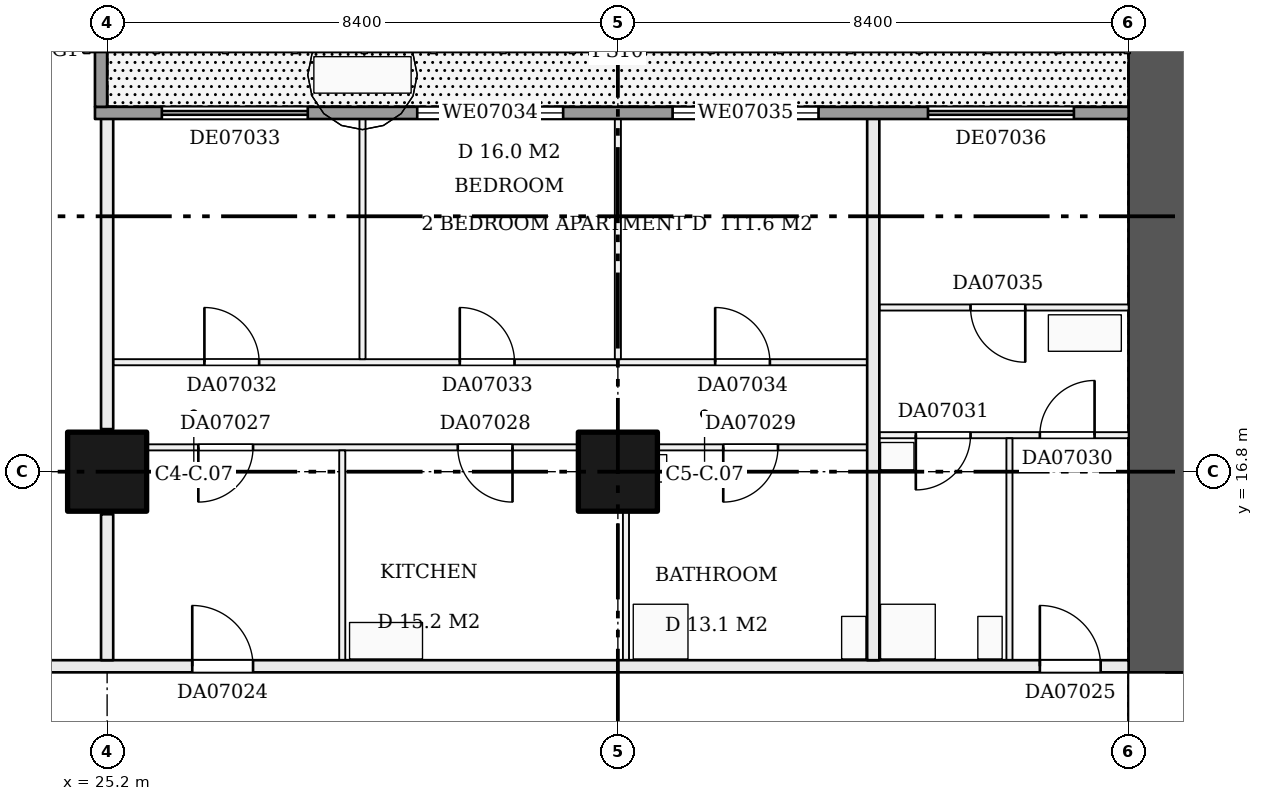
"""IFC4 building model, lengths in metres.
Left out: names, types, materials, properties, quantities, classifications, styles, units other than length and angle.
Written with IfcOpenShell. Run it as: python <this file> out.ifc"""

import sys

from ifc_helpers import new_model, si_unit, direction, frame, frame_2d, origin, origin_2d, place, context, subcontext, project, spatial, rectangle, extrude, element, fill, save


model = new_model("IFC4")
c1 = context("Model", 3, precision=1e-05, world=origin(), true_north=direction((0.0, 1.0)))
c2 = subcontext(c1, "Body", "Model", "MODEL_VIEW")
j1 = project(units=[si_unit("LENGTHUNIT", "METRE"), si_unit("PLANEANGLEUNIT", "RADIAN")], contexts=[c1])
p1 = place(None, origin())
s1 = spatial("IfcSite", under=j1, at=p1, CompositionType="ELEMENT")
p2 = place(p1, origin())
s2 = spatial("IfcBuilding", under=s1, at=p2, CompositionType="ELEMENT")
p3 = place(p2, frame((0.0, 0.0, 35.7)))
s3 = spatial("IfcBuildingStorey", under=s2, at=p3, CompositionType="ELEMENT", Elevation=35.7)
for number, where, z_axis, x_axis in (
    (1, (25.2, 16.8, 0.0), (0.0, 0.0, 1.0), (1.0, 0.0, 0.0)),
    (2, (33.6, 16.8, 0.0), (0.0, 0.0, 1.0), (1.0, 0.0, 0.0)),
):
    element("IfcColumn", number, at=place(p3, frame(where, z_axis=z_axis, x_axis=x_axis)), inside=s3, PredefinedType="COLUMN", context=c2, shape_type="SweptSolid", body=[
        extrude(rectangle(XDim=1.3, YDim=1.3, at=origin_2d()), origin(), (0.0, 0.0, 1.0), 3.22),
    ])
p4 = place(p3, frame((42.6, 9.6, 0.0), z_axis=(0.0, 0.0, 1.0), x_axis=(0.0, 1.0, 0.0)))
e3 = element("IfcWall", 3, at=p4, inside=s3, PredefinedType="SHEAR", context=c2, shape_type="SweptSolid", body=[
    extrude(rectangle(XDim=14.4, YDim=1.2, at=frame_2d((7.2, 0.0))), origin(), (0.0, 0.0, 1.0), 3.22),
])
p5 = place(p4, frame((2.1, 0.0, 0.0)))
e4 = element("IfcOpeningElement", 4, at=p5, cuts=e3, PredefinedType="OPENING", context=c2, shape_type="SweptSolid", body=[
    extrude(rectangle(XDim=1.8, YDim=2.1, at=frame_2d((0.9, 1.05))), frame((0.0, 0.61, 0.0), z_axis=(0.0, -1.0, 0.0), x_axis=(1.0, 0.0, 0.0)), (0.0, 0.0, 1.0), 1.22),
])
p6 = place(p3, frame((16.9, 13.6, 0.0), z_axis=(0.0, 0.0, 1.0), x_axis=(1.0, 0.0, 0.0)))
e5 = element("IfcWall", 5, at=p6, inside=s3, PredefinedType="PARTITIONING", context=c2, shape_type="SweptSolid", body=[
    extrude(rectangle(XDim=25.1, YDim=0.2, at=frame_2d((12.55, 0.0))), origin(), (0.0, 0.0, 1.0), 3.22),
])
p7 = place(p6, frame((9.7, 0.0, 0.0)))
e6 = element("IfcOpeningElement", 6, at=p7, cuts=e5, PredefinedType="OPENING", context=c2, shape_type="SweptSolid", body=[
    extrude(rectangle(XDim=1.0, YDim=2.1, at=frame_2d((0.5, 1.05))), frame((0.0, 0.11, 0.0), z_axis=(0.0, -1.0, 0.0), x_axis=(1.0, 0.0, 0.0)), (0.0, 0.0, 1.0), 0.22),
])
p8 = place(p6, frame((23.64, 0.0, 0.0)))
e7 = element("IfcOpeningElement", 7, at=p8, cuts=e5, PredefinedType="OPENING", context=c2, shape_type="SweptSolid", body=[
    extrude(rectangle(XDim=1.0, YDim=2.1, at=frame_2d((0.5, 1.05))), frame((0.0, 0.11, 0.0), z_axis=(0.0, -1.0, 0.0), x_axis=(1.0, 0.0, 0.0)), (0.0, 0.0, 1.0), 0.22),
])
p9 = place(p6, frame((3.6, 0.0, 0.0)))
e8 = element("IfcOpeningElement", 8, at=p9, cuts=e5, PredefinedType="OPENING", context=c2, shape_type="SweptSolid", body=[
    extrude(rectangle(XDim=1.0, YDim=2.1, at=frame_2d((0.5, 1.05))), frame((0.0, 0.11, 0.0), z_axis=(0.0, -1.0, 0.0), x_axis=(1.0, 0.0, 0.0)), (0.0, 0.0, 1.0), 0.22),
])
p10 = place(p3, frame((25.3, 17.2, 0.0), z_axis=(0.0, 0.0, 1.0), x_axis=(1.0, 0.0, 0.0)))
e9 = element("IfcWall", 9, at=p10, inside=s3, PredefinedType="PARTITIONING", context=c2, shape_type="SweptSolid", body=[
    extrude(rectangle(XDim=12.4, YDim=0.1, at=frame_2d((6.2, 0.0))), origin(), (0.0, 0.0, 1.0), 3.22),
])
p11 = place(p10, frame((1.4, 0.0, 0.0)))
e10 = element("IfcOpeningElement", 10, at=p11, cuts=e9, PredefinedType="OPENING", context=c2, shape_type="SweptSolid", body=[
    extrude(rectangle(XDim=0.9, YDim=2.1, at=frame_2d((0.45, 1.05))), frame((0.0, 0.06, 0.0), z_axis=(0.0, -1.0, 0.0), x_axis=(1.0, 0.0, 0.0)), (0.0, 0.0, 1.0), 0.12),
])
p12 = place(p10, frame((5.667, 0.0, 0.0)))
e11 = element("IfcOpeningElement", 11, at=p12, cuts=e9, PredefinedType="OPENING", context=c2, shape_type="SweptSolid", body=[
    extrude(rectangle(XDim=0.9, YDim=2.1, at=frame_2d((0.45, 1.05))), frame((0.0, 0.06, 0.0), z_axis=(0.0, -1.0, 0.0), x_axis=(1.0, 0.0, 0.0)), (0.0, 0.0, 1.0), 0.12),
])
p13 = place(p10, frame((10.033, 0.0, 0.0)))
e12 = element("IfcOpeningElement", 12, at=p13, cuts=e9, PredefinedType="OPENING", context=c2, shape_type="SweptSolid", body=[
    extrude(rectangle(XDim=0.9, YDim=2.1, at=frame_2d((0.45, 1.05))), frame((0.0, 0.06, 0.0), z_axis=(0.0, -1.0, 0.0), x_axis=(1.0, 0.0, 0.0)), (0.0, 0.0, 1.0), 0.12),
])
p14 = place(p3, frame((37.9, 17.4, 0.0), z_axis=(0.0, 0.0, 1.0), x_axis=(1.0, 0.0, 0.0)))
e13 = element("IfcWall", 13, at=p14, inside=s3, PredefinedType="PARTITIONING", context=c2, shape_type="SweptSolid", body=[
    extrude(rectangle(XDim=4.1, YDim=0.1, at=frame_2d((2.05, 0.0))), origin(), (0.0, 0.0, 1.0), 3.22),
])
p15 = place(p14, frame((2.64, 0.0, 0.0)))
e14 = element("IfcOpeningElement", 14, at=p15, cuts=e13, PredefinedType="OPENING", context=c2, shape_type="SweptSolid", body=[
    extrude(rectangle(XDim=0.9, YDim=2.1, at=frame_2d((0.45, 1.05))), frame((0.0, 0.06, 0.0), z_axis=(0.0, -1.0, 0.0), x_axis=(1.0, 0.0, 0.0)), (0.0, 0.0, 1.0), 0.12),
])
p16 = place(p14, frame((0.6, 0.0, 0.0)))
e15 = element("IfcOpeningElement", 15, at=p16, cuts=e13, PredefinedType="OPENING", context=c2, shape_type="SweptSolid", body=[
    extrude(rectangle(XDim=0.9, YDim=2.1, at=frame_2d((0.45, 1.05))), frame((0.0, 0.06, 0.0), z_axis=(0.0, -1.0, 0.0), x_axis=(1.0, 0.0, 0.0)), (0.0, 0.0, 1.0), 0.12),
])
p17 = place(p3, frame((25.3, 18.6, 0.0), z_axis=(0.0, 0.0, 1.0), x_axis=(1.0, 0.0, 0.0)))
e16 = element("IfcWall", 16, at=p17, inside=s3, PredefinedType="PARTITIONING", context=c2, shape_type="SweptSolid", body=[
    extrude(rectangle(XDim=12.4, YDim=0.1, at=frame_2d((6.2, 0.0))), origin(), (0.0, 0.0, 1.0), 3.22),
])
p18 = place(p17, frame((1.5, 0.0, 0.0)))
e17 = element("IfcOpeningElement", 17, at=p18, cuts=e16, PredefinedType="OPENING", context=c2, shape_type="SweptSolid", body=[
    extrude(rectangle(XDim=0.9, YDim=2.1, at=frame_2d((0.45, 1.05))), frame((0.0, 0.06, 0.0), z_axis=(0.0, -1.0, 0.0), x_axis=(1.0, 0.0, 0.0)), (0.0, 0.0, 1.0), 0.12),
])
p19 = place(p17, frame((5.7, 0.0, 0.0)))
e18 = element("IfcOpeningElement", 18, at=p19, cuts=e16, PredefinedType="OPENING", context=c2, shape_type="SweptSolid", body=[
    extrude(rectangle(XDim=0.9, YDim=2.1, at=frame_2d((0.45, 1.05))), frame((0.0, 0.06, 0.0), z_axis=(0.0, -1.0, 0.0), x_axis=(1.0, 0.0, 0.0)), (0.0, 0.0, 1.0), 0.12),
])
p20 = place(p17, frame((9.9, 0.0, 0.0)))
e19 = element("IfcOpeningElement", 19, at=p20, cuts=e16, PredefinedType="OPENING", context=c2, shape_type="SweptSolid", body=[
    extrude(rectangle(XDim=0.9, YDim=2.1, at=frame_2d((0.45, 1.05))), frame((0.0, 0.06, 0.0), z_axis=(0.0, -1.0, 0.0), x_axis=(1.0, 0.0, 0.0)), (0.0, 0.0, 1.0), 0.12),
])
p21 = place(p3, frame((37.9, 19.5, 0.0), z_axis=(0.0, 0.0, 1.0), x_axis=(1.0, 0.0, 0.0)))
e20 = element("IfcWall", 20, at=p21, inside=s3, PredefinedType="PARTITIONING", context=c2, shape_type="SweptSolid", body=[
    extrude(rectangle(XDim=4.1, YDim=0.1, at=frame_2d((2.05, 0.0))), origin(), (0.0, 0.0, 1.0), 3.22),
])
p22 = place(p21, frame((1.5, 0.0, 0.0)))
e21 = element("IfcOpeningElement", 21, at=p22, cuts=e20, PredefinedType="OPENING", context=c2, shape_type="SweptSolid", body=[
    extrude(rectangle(XDim=0.9, YDim=2.1, at=frame_2d((0.45, 1.05))), frame((0.0, 0.06, 0.0), z_axis=(0.0, -1.0, 0.0), x_axis=(1.0, 0.0, 0.0)), (0.0, 0.0, 1.0), 0.12),
])
p23 = place(p3, frame((25.2, 13.7, 0.0), z_axis=(0.0, 0.0, 1.0), x_axis=(0.0, 1.0, 0.0)))
e22 = element("IfcWall", 22, at=p23, inside=s3, PredefinedType="PARTITIONING", context=c2, shape_type="SweptSolid", body=[
    extrude(rectangle(XDim=2.4, YDim=0.2, at=frame_2d((1.2, 0.0))), origin(), (0.0, 0.0, 1.0), 3.22),
])
p24 = place(p3, frame((25.2, 17.5, 0.0), z_axis=(0.0, 0.0, 1.0), x_axis=(0.0, 1.0, 0.0)))
e23 = element("IfcWall", 23, at=p24, inside=s3, PredefinedType="PARTITIONING", context=c2, shape_type="SweptSolid", body=[
    extrude(rectangle(XDim=5.2, YDim=0.2, at=frame_2d((2.6, 0.0))), origin(), (0.0, 0.0, 1.0), 3.22),
])
p25 = place(p3, frame((29.067, 13.7, 0.0), z_axis=(0.0, 0.0, 1.0), x_axis=(0.0, 1.0, 0.0)))
e24 = element("IfcWall", 24, at=p25, inside=s3, PredefinedType="PARTITIONING", context=c2, shape_type="SweptSolid", body=[
    extrude(rectangle(XDim=3.45, YDim=0.1, at=frame_2d((1.725, 0.0))), origin(), (0.0, 0.0, 1.0), 3.22),
])
for number, where, z_axis, x_axis in (
    (25, (29.4, 18.65, 0.0), (0.0, 0.0, 1.0), (0.0, 1.0, 0.0)),
    (26, (33.6, 18.65, 0.0), (0.0, 0.0, 1.0), (0.0, 1.0, 0.0)),
):
    element("IfcWall", number, at=place(p3, frame(where, z_axis=z_axis, x_axis=x_axis)), inside=s3, PredefinedType="PARTITIONING", context=c2, shape_type="SweptSolid", body=[
        extrude(rectangle(XDim=4.05, YDim=0.1, at=frame_2d((2.025, 0.0))), origin(), (0.0, 0.0, 1.0), 3.22),
    ])
p26 = place(p3, frame((33.733, 13.7, 0.0), z_axis=(0.0, 0.0, 1.0), x_axis=(0.0, 1.0, 0.0)))
e27 = element("IfcWall", 27, at=p26, inside=s3, PredefinedType="PARTITIONING", context=c2, shape_type="SweptSolid", body=[
    extrude(rectangle(XDim=3.45, YDim=0.1, at=frame_2d((1.725, 0.0))), origin(), (0.0, 0.0, 1.0), 3.22),
])
p27 = place(p3, frame((37.8, 13.7, 0.0), z_axis=(0.0, 0.0, 1.0), x_axis=(0.0, 1.0, 0.0)))
e28 = element("IfcWall", 28, at=p27, inside=s3, PredefinedType="PARTITIONING", context=c2, shape_type="SweptSolid", body=[
    extrude(rectangle(XDim=9.0, YDim=0.2, at=frame_2d((4.5, 0.0))), origin(), (0.0, 0.0, 1.0), 3.22),
])
p28 = place(p3, frame((40.04, 13.7, 0.0), z_axis=(0.0, 0.0, 1.0), x_axis=(0.0, 1.0, 0.0)))
e29 = element("IfcWall", 29, at=p28, inside=s3, PredefinedType="PARTITIONING", context=c2, shape_type="SweptSolid", body=[
    extrude(rectangle(XDim=3.65, YDim=0.1, at=frame_2d((1.825, 0.0))), origin(), (0.0, 0.0, 1.0), 3.22),
])
p29 = place(p3, frame((42.0, 22.7, 0.0), z_axis=(0.0, 0.0, 1.0), x_axis=(-1.0, 0.0, 0.0)))
e30 = element("IfcWall", 30, at=p29, inside=s3, PredefinedType="SOLIDWALL", context=c2, shape_type="SweptSolid", body=[
    extrude(rectangle(XDim=17.0, YDim=0.2, at=frame_2d((8.5, 0.0))), origin(), (0.0, 0.0, 1.0), 3.22),
])
p30 = place(p29, frame((13.5, 0.0, 0.0)))
e31 = element("IfcOpeningElement", 31, at=p30, cuts=e30, PredefinedType="OPENING", context=c2, shape_type="SweptSolid", body=[
    extrude(rectangle(XDim=2.4, YDim=2.2, at=frame_2d((1.2, 1.1))), frame((0.0, 0.11, 0.0), z_axis=(0.0, -1.0, 0.0), x_axis=(1.0, 0.0, 0.0)), (0.0, 0.0, 1.0), 0.22),
])
p31 = place(p29, frame((9.3, 0.0, 0.9)))
e32 = element("IfcOpeningElement", 32, at=p31, cuts=e30, PredefinedType="OPENING", context=c2, shape_type="SweptSolid", body=[
    extrude(rectangle(XDim=2.4, YDim=1.5, at=frame_2d((1.2, 0.75))), frame((0.0, 0.11, 0.0), z_axis=(0.0, -1.0, 0.0), x_axis=(1.0, 0.0, 0.0)), (0.0, 0.0, 1.0), 0.22),
])
p32 = place(p29, frame((5.1, 0.0, 0.9)))
e33 = element("IfcOpeningElement", 33, at=p32, cuts=e30, PredefinedType="OPENING", context=c2, shape_type="SweptSolid", body=[
    extrude(rectangle(XDim=2.4, YDim=1.5, at=frame_2d((1.2, 0.75))), frame((0.0, 0.11, 0.0), z_axis=(0.0, -1.0, 0.0), x_axis=(1.0, 0.0, 0.0)), (0.0, 0.0, 1.0), 0.22),
])
p33 = place(p29, frame((0.9, 0.0, 0.0)))
e34 = element("IfcOpeningElement", 34, at=p33, cuts=e30, PredefinedType="OPENING", context=c2, shape_type="SweptSolid", body=[
    extrude(rectangle(XDim=2.4, YDim=2.2, at=frame_2d((1.2, 1.1))), frame((0.0, 0.11, 0.0), z_axis=(0.0, -1.0, 0.0), x_axis=(1.0, 0.0, 0.0)), (0.0, 0.0, 1.0), 0.22),
])
p34 = place(p3, frame((25.1, 22.8, 0.0), z_axis=(0.0, 0.0, 1.0), x_axis=(0.0, 1.0, 0.0)))
e35 = element("IfcWall", 35, at=p34, inside=s3, PredefinedType="SOLIDWALL", context=c2, shape_type="SweptSolid", body=[
    extrude(rectangle(XDim=1.7, YDim=0.2, at=frame_2d((0.85, 0.0))), origin(), (0.0, 0.0, 1.0), 3.22),
])
p35 = place(p5, frame((1.8, 0.0, 0.0), z_axis=(0.0, 0.0, 1.0), x_axis=(-1.0, 0.0, 0.0)))
e36 = element("IfcDoor", 36, at=p35, inside=s3, OperationType="DOUBLE_DOOR_SINGLE_SWING", PredefinedType="DOOR", context=c2, shape_type="SweptSolid", body=[
    extrude(rectangle(XDim=1.8, YDim=2.1, at=frame_2d((0.9, 1.05))), frame((0.0, 0.025, 0.0), z_axis=(0.0, -1.0, 0.0), x_axis=(1.0, 0.0, 0.0)), (0.0, 0.0, 1.0), 0.05),
])
fill(e4, e36)
p36 = place(p7, origin())
e37 = element("IfcDoor", 37, at=p36, inside=s3, OperationType="SINGLE_SWING_LEFT", PredefinedType="DOOR", context=c2, shape_type="SweptSolid", body=[
    extrude(rectangle(XDim=1.0, YDim=2.1, at=frame_2d((0.5, 1.05))), frame((0.0, 0.025, 0.0), z_axis=(0.0, -1.0, 0.0), x_axis=(1.0, 0.0, 0.0)), (0.0, 0.0, 1.0), 0.05),
])
fill(e6, e37)
p37 = place(p8, origin())
e38 = element("IfcDoor", 38, at=p37, inside=s3, OperationType="SINGLE_SWING_LEFT", PredefinedType="DOOR", context=c2, shape_type="SweptSolid", body=[
    extrude(rectangle(XDim=1.0, YDim=2.1, at=frame_2d((0.5, 1.05))), frame((0.0, 0.025, 0.0), z_axis=(0.0, -1.0, 0.0), x_axis=(1.0, 0.0, 0.0)), (0.0, 0.0, 1.0), 0.05),
])
fill(e7, e38)
p38 = place(p11, frame((0.9, 0.0, 0.0), z_axis=(0.0, 0.0, 1.0), x_axis=(-1.0, 0.0, 0.0)))
e39 = element("IfcDoor", 39, at=p38, inside=s3, OperationType="SINGLE_SWING_RIGHT", PredefinedType="DOOR", context=c2, shape_type="SweptSolid", body=[
    extrude(rectangle(XDim=0.9, YDim=2.1, at=frame_2d((0.45, 1.05))), frame((0.0, 0.025, 0.0), z_axis=(0.0, -1.0, 0.0), x_axis=(1.0, 0.0, 0.0)), (0.0, 0.0, 1.0), 0.05),
])
fill(e10, e39)
p39 = place(p12, frame((0.9, 0.0, 0.0), z_axis=(0.0, 0.0, 1.0), x_axis=(-1.0, 0.0, 0.0)))
e40 = element("IfcDoor", 40, at=p39, inside=s3, OperationType="SINGLE_SWING_LEFT", PredefinedType="DOOR", context=c2, shape_type="SweptSolid", body=[
    extrude(rectangle(XDim=0.9, YDim=2.1, at=frame_2d((0.45, 1.05))), frame((0.0, 0.025, 0.0), z_axis=(0.0, -1.0, 0.0), x_axis=(1.0, 0.0, 0.0)), (0.0, 0.0, 1.0), 0.05),
])
fill(e11, e40)
p40 = place(p13, frame((0.9, 0.0, 0.0), z_axis=(0.0, 0.0, 1.0), x_axis=(-1.0, 0.0, 0.0)))
e41 = element("IfcDoor", 41, at=p40, inside=s3, OperationType="SINGLE_SWING_RIGHT", PredefinedType="DOOR", context=c2, shape_type="SweptSolid", body=[
    extrude(rectangle(XDim=0.9, YDim=2.1, at=frame_2d((0.45, 1.05))), frame((0.0, 0.025, 0.0), z_axis=(0.0, -1.0, 0.0), x_axis=(1.0, 0.0, 0.0)), (0.0, 0.0, 1.0), 0.05),
])
fill(e12, e41)
p41 = place(p15, origin())
e42 = element("IfcDoor", 42, at=p41, inside=s3, OperationType="SINGLE_SWING_RIGHT", PredefinedType="DOOR", context=c2, shape_type="SweptSolid", body=[
    extrude(rectangle(XDim=0.9, YDim=2.1, at=frame_2d((0.45, 1.05))), frame((0.0, 0.025, 0.0), z_axis=(0.0, -1.0, 0.0), x_axis=(1.0, 0.0, 0.0)), (0.0, 0.0, 1.0), 0.05),
])
fill(e14, e42)
p42 = place(p16, frame((0.9, 0.0, 0.0), z_axis=(0.0, 0.0, 1.0), x_axis=(-1.0, 0.0, 0.0)))
e43 = element("IfcDoor", 43, at=p42, inside=s3, OperationType="SINGLE_SWING_RIGHT", PredefinedType="DOOR", context=c2, shape_type="SweptSolid", body=[
    extrude(rectangle(XDim=0.9, YDim=2.1, at=frame_2d((0.45, 1.05))), frame((0.0, 0.025, 0.0), z_axis=(0.0, -1.0, 0.0), x_axis=(1.0, 0.0, 0.0)), (0.0, 0.0, 1.0), 0.05),
])
fill(e15, e43)
p43 = place(p18, origin())
e44 = element("IfcDoor", 44, at=p43, inside=s3, OperationType="SINGLE_SWING_LEFT", PredefinedType="DOOR", context=c2, shape_type="SweptSolid", body=[
    extrude(rectangle(XDim=0.9, YDim=2.1, at=frame_2d((0.45, 1.05))), frame((0.0, 0.025, 0.0), z_axis=(0.0, -1.0, 0.0), x_axis=(1.0, 0.0, 0.0)), (0.0, 0.0, 1.0), 0.05),
])
fill(e17, e44)
p44 = place(p19, origin())
e45 = element("IfcDoor", 45, at=p44, inside=s3, OperationType="SINGLE_SWING_LEFT", PredefinedType="DOOR", context=c2, shape_type="SweptSolid", body=[
    extrude(rectangle(XDim=0.9, YDim=2.1, at=frame_2d((0.45, 1.05))), frame((0.0, 0.025, 0.0), z_axis=(0.0, -1.0, 0.0), x_axis=(1.0, 0.0, 0.0)), (0.0, 0.0, 1.0), 0.05),
])
fill(e18, e45)
p45 = place(p20, origin())
e46 = element("IfcDoor", 46, at=p45, inside=s3, OperationType="SINGLE_SWING_LEFT", PredefinedType="DOOR", context=c2, shape_type="SweptSolid", body=[
    extrude(rectangle(XDim=0.9, YDim=2.1, at=frame_2d((0.45, 1.05))), frame((0.0, 0.025, 0.0), z_axis=(0.0, -1.0, 0.0), x_axis=(1.0, 0.0, 0.0)), (0.0, 0.0, 1.0), 0.05),
])
fill(e19, e46)
p46 = place(p22, frame((0.9, 0.0, 0.0), z_axis=(0.0, 0.0, 1.0), x_axis=(-1.0, 0.0, 0.0)))
e47 = element("IfcDoor", 47, at=p46, inside=s3, OperationType="SINGLE_SWING_LEFT", PredefinedType="DOOR", context=c2, shape_type="SweptSolid", body=[
    extrude(rectangle(XDim=0.9, YDim=2.1, at=frame_2d((0.45, 1.05))), frame((0.0, 0.025, 0.0), z_axis=(0.0, -1.0, 0.0), x_axis=(1.0, 0.0, 0.0)), (0.0, 0.0, 1.0), 0.05),
])
fill(e21, e47)
p47 = place(p30, origin())
e48 = element("IfcDoor", 48, at=p47, inside=s3, OperationType="DOUBLE_DOOR_SLIDING", PredefinedType="DOOR", context=c2, shape_type="SweptSolid", body=[
    extrude(rectangle(XDim=2.4, YDim=2.2, at=frame_2d((1.2, 1.1))), frame((0.0, 0.025, 0.0), z_axis=(0.0, -1.0, 0.0), x_axis=(1.0, 0.0, 0.0)), (0.0, 0.0, 1.0), 0.05),
])
fill(e31, e48)
p48 = place(p31, origin())
e49 = element("IfcWindow", 49, at=p48, inside=s3, PartitioningType="SINGLE_PANEL", PredefinedType="WINDOW", context=c2, shape_type="SweptSolid", body=[
    extrude(rectangle(XDim=2.4, YDim=1.5, at=frame_2d((1.2, 0.75))), frame((0.0, 0.03, 0.0), z_axis=(0.0, -1.0, 0.0), x_axis=(1.0, 0.0, 0.0)), (0.0, 0.0, 1.0), 0.06),
])
fill(e32, e49)
p49 = place(p32, origin())
e50 = element("IfcWindow", 50, at=p49, inside=s3, PartitioningType="SINGLE_PANEL", PredefinedType="WINDOW", context=c2, shape_type="SweptSolid", body=[
    extrude(rectangle(XDim=2.4, YDim=1.5, at=frame_2d((1.2, 0.75))), frame((0.0, 0.03, 0.0), z_axis=(0.0, -1.0, 0.0), x_axis=(1.0, 0.0, 0.0)), (0.0, 0.0, 1.0), 0.06),
])
fill(e33, e50)
p50 = place(p33, origin())
e51 = element("IfcDoor", 51, at=p50, inside=s3, OperationType="DOUBLE_DOOR_SLIDING", PredefinedType="DOOR", context=c2, shape_type="SweptSolid", body=[
    extrude(rectangle(XDim=2.4, YDim=2.2, at=frame_2d((1.2, 1.1))), frame((0.0, 0.025, 0.0), z_axis=(0.0, -1.0, 0.0), x_axis=(1.0, 0.0, 0.0)), (0.0, 0.0, 1.0), 0.05),
])
fill(e34, e51)
save(model, sys.argv[1])
